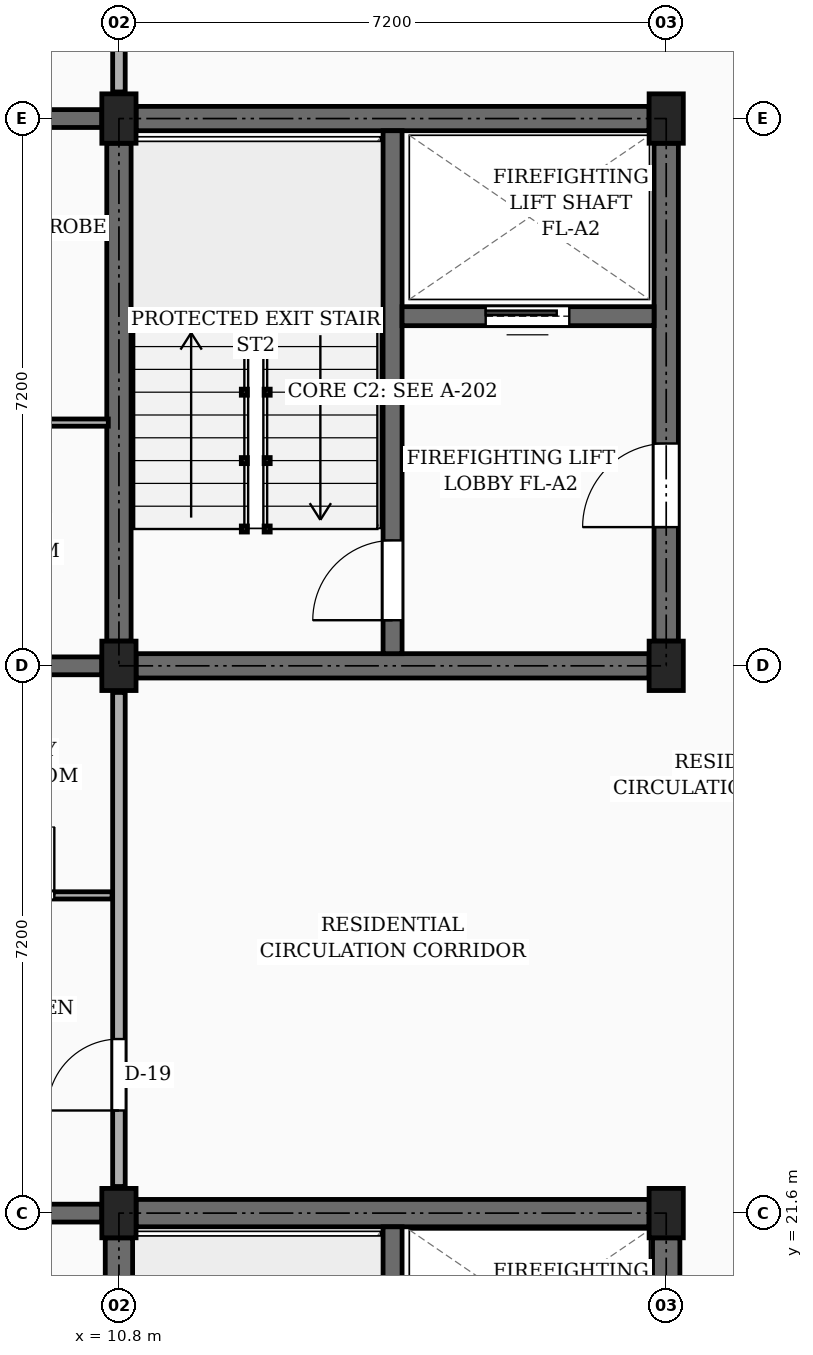
"""IFC4 building model, lengths in metres.
Left out: names, types, materials, properties, quantities, classifications, styles, units other than length and angle.
Written with IfcOpenShell. Run it as: python <this file> out.ifc"""

import sys

from ifc_helpers import new_model, si_unit, direction, frame, frame_2d, origin, origin_2d, place, context, subcontext, project, spatial, rectangle, extrude, element, fill, save


model = new_model("IFC4")
c1 = context("Model", 3, precision=1e-05, world=origin(), true_north=direction((0.0, 1.0)))
c2 = subcontext(c1, "Body", "Model", "MODEL_VIEW")
j1 = project(units=[si_unit("LENGTHUNIT", "METRE"), si_unit("PLANEANGLEUNIT", "RADIAN")], contexts=[c1])
p1 = place(None, origin())
s1 = spatial("IfcSite", under=j1, at=p1, CompositionType="ELEMENT")
p2 = place(p1, origin())
s2 = spatial("IfcBuilding", under=s1, at=p2, CompositionType="ELEMENT")
p3 = place(p2, frame((0.0, 0.0, 17.1)))
s3 = spatial("IfcBuildingStorey", under=s2, at=p3, CompositionType="ELEMENT", Elevation=17.1)
for number, where, z_axis, x_axis in (
    (1, (10.8, 21.6, 0.0), (0.0, 0.0, 1.0), (1.0, 0.0, 0.0)),
    (2, (10.8, 28.8, 0.0), (0.0, 0.0, 1.0), (1.0, 0.0, 0.0)),
    (3, (10.8, 36.0, 0.0), (0.0, 0.0, 1.0), (1.0, 0.0, 0.0)),
    (4, (18.0, 21.6, 0.0), (0.0, 0.0, 1.0), (1.0, 0.0, 0.0)),
    (5, (18.0, 28.8, 0.0), (0.0, 0.0, 1.0), (1.0, 0.0, 0.0)),
    (6, (18.0, 36.0, 0.0), (0.0, 0.0, 1.0), (1.0, 0.0, 0.0)),
):
    element("IfcColumn", number, at=place(p3, frame(where, z_axis=z_axis, x_axis=x_axis)), inside=s3, PredefinedType="COLUMN", context=c2, shape_type="SweptSolid", body=[
        extrude(rectangle(XDim=0.45, YDim=0.65, at=origin_2d()), origin(), (0.0, 0.0, 1.0), 3.15),
    ])
p4 = place(p3, frame((3.875, 21.6, 0.0), z_axis=(0.0, 0.0, 1.0), x_axis=(1.0, 0.0, 0.0)))
e7 = element("IfcWall", 7, at=p4, inside=s3, PredefinedType="SOLIDWALL", context=c2, shape_type="SweptSolid", body=[
    extrude(rectangle(XDim=6.7, YDim=0.235, at=frame_2d((3.35, 0.0))), origin(), (0.0, 0.0, 1.0), 2.17),
])
p5 = place(p3, frame((3.875, 28.8, 0.0), z_axis=(0.0, 0.0, 1.0), x_axis=(1.0, 0.0, 0.0)))
e8 = element("IfcWall", 8, at=p5, inside=s3, PredefinedType="SOLIDWALL", context=c2, shape_type="SweptSolid", body=[
    extrude(rectangle(XDim=6.7, YDim=0.235, at=frame_2d((3.35, 0.0))), origin(), (0.0, 0.0, 1.0), 2.17),
])
p6 = place(p5, frame((1.35, 0.0, 0.0)))
e9 = element("IfcOpeningElement", 9, at=p6, cuts=e8, PredefinedType="OPENING", context=c2, shape_type="SweptSolid", body=[
    extrude(rectangle(XDim=0.98, YDim=2.12, at=frame_2d((0.49, 1.06))), frame((0.0, 0.127, 0.0), z_axis=(0.0, -1.0, 0.0), x_axis=(1.0, 0.0, 0.0)), (0.0, 0.0, 1.0), 0.255),
])
p7 = place(p3, frame((3.875, 36.0, 0.0), z_axis=(0.0, 0.0, 1.0), x_axis=(1.0, 0.0, 0.0)))
e10 = element("IfcWall", 10, at=p7, inside=s3, PredefinedType="SOLIDWALL", context=c2, shape_type="SweptSolid", body=[
    extrude(rectangle(XDim=6.7, YDim=0.235, at=frame_2d((3.35, 0.0))), origin(), (0.0, 0.0, 1.0), 2.17),
])
p8 = place(p3, frame((10.8, 14.725, 0.0), z_axis=(0.0, 0.0, 1.0), x_axis=(0.0, 1.0, 0.0)))
e11 = element("IfcWall", 11, at=p8, inside=s3, PredefinedType="SHEAR", context=c2, shape_type="SweptSolid", body=[
    extrude(rectangle(XDim=6.55, YDim=0.36, at=frame_2d((3.275, 0.0))), origin(), (0.0, 0.0, 1.0), 2.87),
])
p9 = place(p3, frame((11.025, 21.6, 0.0), z_axis=(0.0, 0.0, 1.0), x_axis=(1.0, 0.0, 0.0)))
e12 = element("IfcWall", 12, at=p9, inside=s3, PredefinedType="SHEAR", context=c2, shape_type="SweptSolid", body=[
    extrude(rectangle(XDim=6.75, YDim=0.36, at=frame_2d((3.375, 0.0))), origin(), (0.0, 0.0, 1.0), 2.87),
])
p10 = place(p3, frame((18.0, 14.725, 0.0), z_axis=(0.0, 0.0, 1.0), x_axis=(0.0, 1.0, 0.0)))
e13 = element("IfcWall", 13, at=p10, inside=s3, PredefinedType="SHEAR", context=c2, shape_type="SweptSolid", body=[
    extrude(rectangle(XDim=6.55, YDim=0.36, at=frame_2d((3.275, 0.0))), origin(), (0.0, 0.0, 1.0), 2.87),
])
p11 = place(p10, frame((1.5, 0.0, 0.0)))
e14 = element("IfcOpeningElement", 14, at=p11, cuts=e13, PredefinedType="OPENING", context=c2, shape_type="SweptSolid", body=[
    extrude(rectangle(XDim=1.1, YDim=2.15, at=frame_2d((0.55, 1.075))), frame((0.0, 0.19, 0.0), z_axis=(0.0, -1.0, 0.0), x_axis=(1.0, 0.0, 0.0)), (0.0, 0.0, 1.0), 0.38),
])
p12 = place(p3, frame((14.4, 14.58, 0.0), z_axis=(0.0, 0.0, 1.0), x_axis=(0.0, 1.0, 0.0)))
e15 = element("IfcWall", 15, at=p12, inside=s3, PredefinedType="SHEAR", context=c2, shape_type="SweptSolid", body=[
    extrude(rectangle(XDim=6.84, YDim=0.25, at=frame_2d((3.42, 0.0))), origin(), (0.0, 0.0, 1.0), 2.87),
])
p13 = place(p12, frame((0.42, 0.0, 0.0)))
e16 = element("IfcOpeningElement", 16, at=p13, cuts=e15, PredefinedType="OPENING", context=c2, shape_type="SweptSolid", body=[
    extrude(rectangle(XDim=1.05, YDim=2.15, at=frame_2d((0.525, 1.075))), frame((0.0, 0.135, 0.0), z_axis=(0.0, -1.0, 0.0), x_axis=(1.0, 0.0, 0.0)), (0.0, 0.0, 1.0), 0.27),
])
p14 = place(p3, frame((10.8, 29.125, 0.0), z_axis=(0.0, 0.0, 1.0), x_axis=(0.0, 1.0, 0.0)))
e17 = element("IfcWall", 17, at=p14, inside=s3, PredefinedType="SHEAR", context=c2, shape_type="SweptSolid", body=[
    extrude(rectangle(XDim=6.55, YDim=0.32, at=frame_2d((3.275, 0.0))), origin(), (0.0, 0.0, 1.0), 2.87),
])
p15 = place(p3, frame((11.025, 36.0, 0.0), z_axis=(0.0, 0.0, 1.0), x_axis=(1.0, 0.0, 0.0)))
e18 = element("IfcWall", 18, at=p15, inside=s3, PredefinedType="SHEAR", context=c2, shape_type="SweptSolid", body=[
    extrude(rectangle(XDim=6.75, YDim=0.32, at=frame_2d((3.375, 0.0))), origin(), (0.0, 0.0, 1.0), 2.87),
])
p16 = place(p3, frame((18.0, 29.125, 0.0), z_axis=(0.0, 0.0, 1.0), x_axis=(0.0, 1.0, 0.0)))
e19 = element("IfcWall", 19, at=p16, inside=s3, PredefinedType="SHEAR", context=c2, shape_type="SweptSolid", body=[
    extrude(rectangle(XDim=6.55, YDim=0.32, at=frame_2d((3.275, 0.0))), origin(), (0.0, 0.0, 1.0), 2.87),
])
p17 = place(p16, frame((1.5, 0.0, 0.0)))
e20 = element("IfcOpeningElement", 20, at=p17, cuts=e19, PredefinedType="OPENING", context=c2, shape_type="SweptSolid", body=[
    extrude(rectangle(XDim=1.1, YDim=2.15, at=frame_2d((0.55, 1.075))), frame((0.0, 0.17, 0.0), z_axis=(0.0, -1.0, 0.0), x_axis=(1.0, 0.0, 0.0)), (0.0, 0.0, 1.0), 0.34),
])
p18 = place(p3, frame((11.025, 28.8, 0.0), z_axis=(0.0, 0.0, 1.0), x_axis=(1.0, 0.0, 0.0)))
e21 = element("IfcWall", 21, at=p18, inside=s3, PredefinedType="SHEAR", context=c2, shape_type="SweptSolid", body=[
    extrude(rectangle(XDim=6.75, YDim=0.32, at=frame_2d((3.375, 0.0))), origin(), (0.0, 0.0, 1.0), 2.87),
])
p19 = place(p3, frame((14.4, 28.96, 0.0), z_axis=(0.0, 0.0, 1.0), x_axis=(0.0, 1.0, 0.0)))
e22 = element("IfcWall", 22, at=p19, inside=s3, PredefinedType="SHEAR", context=c2, shape_type="SweptSolid", body=[
    extrude(rectangle(XDim=6.88, YDim=0.25, at=frame_2d((3.44, 0.0))), origin(), (0.0, 0.0, 1.0), 2.87),
])
p20 = place(p19, frame((0.44, 0.0, 0.0)))
e23 = element("IfcOpeningElement", 23, at=p20, cuts=e22, PredefinedType="OPENING", context=c2, shape_type="SweptSolid", body=[
    extrude(rectangle(XDim=1.05, YDim=2.15, at=frame_2d((0.525, 1.075))), frame((0.0, 0.135, 0.0), z_axis=(0.0, -1.0, 0.0), x_axis=(1.0, 0.0, 0.0)), (0.0, 0.0, 1.0), 0.27),
])
p21 = place(p3, frame((14.525, 33.4, 0.0), z_axis=(0.0, 0.0, 1.0), x_axis=(1.0, 0.0, 0.0)))
e24 = element("IfcWall", 24, at=p21, inside=s3, PredefinedType="SHEAR", context=c2, shape_type="SweptSolid", body=[
    extrude(rectangle(XDim=3.315, YDim=0.25, at=frame_2d((1.658, 0.0))), origin(), (0.0, 0.0, 1.0), 2.87),
])
p22 = place(p21, frame((1.1, 0.0, 0.0)))
e25 = element("IfcOpeningElement", 25, at=p22, cuts=e24, PredefinedType="OPENING", context=c2, shape_type="SweptSolid", body=[
    extrude(rectangle(XDim=1.1, YDim=2.2, at=frame_2d((0.55, 1.1))), frame((0.0, 0.135, 0.0), z_axis=(0.0, -1.0, 0.0), x_axis=(1.0, 0.0, 0.0)), (0.0, 0.0, 1.0), 0.27),
])
p23 = place(p3, frame((10.8, 21.95, 0.0), z_axis=(0.0, 0.0, 1.0), x_axis=(0.0, 1.0, 0.0)))
e26 = element("IfcWall", 26, at=p23, inside=s3, PredefinedType="PARTITIONING", context=c2, shape_type="SweptSolid", body=[
    extrude(rectangle(XDim=6.5, YDim=0.165, at=frame_2d((3.25, 0.0))), origin(), (0.0, 0.0, 1.0), 2.305),
])
p24 = place(p23, frame((1.0, 0.0, 0.0)))
e27 = element("IfcOpeningElement", 27, at=p24, cuts=e26, PredefinedType="OPENING", context=c2, shape_type="SweptSolid", body=[
    extrude(rectangle(XDim=0.94, YDim=2.12, at=frame_2d((0.47, 1.06))), frame((0.0, 0.093, 0.0), z_axis=(0.0, -1.0, 0.0), x_axis=(1.0, 0.0, 0.0)), (0.0, 0.0, 1.0), 0.185),
])
p25 = place(p3, frame((10.8, 36.35, 0.0), z_axis=(0.0, 0.0, 1.0), x_axis=(0.0, 1.0, 0.0)))
e28 = element("IfcWall", 28, at=p25, inside=s3, PredefinedType="PARTITIONING", context=c2, shape_type="SweptSolid", body=[
    extrude(rectangle(XDim=6.5, YDim=0.165, at=frame_2d((3.25, 0.0))), origin(), (0.0, 0.0, 1.0), 2.305),
])
p26 = place(p25, frame((1.0, 0.0, 0.0)))
e29 = element("IfcOpeningElement", 29, at=p26, cuts=e28, PredefinedType="OPENING", context=c2, shape_type="SweptSolid", body=[
    extrude(rectangle(XDim=1.14, YDim=2.18, at=frame_2d((0.57, 1.09))), frame((0.0, 0.093, 0.0), z_axis=(0.0, -1.0, 0.0), x_axis=(1.0, 0.0, 0.0)), (0.0, 0.0, 1.0), 0.185),
])
p27 = place(p3, frame((8.29, 25.78, 0.0), z_axis=(0.0, 0.0, 1.0), x_axis=(1.0, 0.0, 0.0)))
e30 = element("IfcWall", 30, at=p27, inside=s3, PredefinedType="PARTITIONING", context=c2, shape_type="SweptSolid", body=[
    extrude(rectangle(XDim=2.42, YDim=0.095, at=frame_2d((1.21, 0.0))), origin(), (0.0, 0.0, 1.0), 2.305),
])
p28 = place(p27, frame((0.76, 0.0, 0.0)))
e31 = element("IfcOpeningElement", 31, at=p28, cuts=e30, PredefinedType="OPENING", context=c2, shape_type="SweptSolid", body=[
    extrude(rectangle(XDim=0.9, YDim=2.05, at=frame_2d((0.45, 1.025))), frame((0.0, 0.058, 0.0), z_axis=(0.0, -1.0, 0.0), x_axis=(1.0, 0.0, 0.0)), (0.0, 0.0, 1.0), 0.115),
])
p29 = place(p3, frame((7.27, 32.0, 0.0), z_axis=(0.0, 0.0, 1.0), x_axis=(1.0, 0.0, 0.0)))
e32 = element("IfcWall", 32, at=p29, inside=s3, PredefinedType="PARTITIONING", context=c2, shape_type="SweptSolid", body=[
    extrude(rectangle(XDim=3.39, YDim=0.095, at=frame_2d((1.695, 0.0))), origin(), (0.0, 0.0, 1.0), 2.305),
])
p30 = place(p17, frame((1.1, 0.0, 0.0), z_axis=(0.0, 0.0, 1.0), x_axis=(-1.0, 0.0, 0.0)))
e33 = element("IfcDoor", 33, at=p30, inside=s3, OperationType="SINGLE_SWING_LEFT", PredefinedType="DOOR", context=c2, shape_type="SweptSolid", body=[
    extrude(rectangle(XDim=1.1, YDim=2.15, at=frame_2d((0.55, 1.075))), frame((0.0, 0.025, 0.0), z_axis=(0.0, -1.0, 0.0), x_axis=(1.0, 0.0, 0.0)), (0.0, 0.0, 1.0), 0.05),
])
fill(e20, e33)
p31 = place(p20, origin())
e34 = element("IfcDoor", 34, at=p31, inside=s3, OperationType="SINGLE_SWING_LEFT", PredefinedType="DOOR", context=c2, shape_type="SweptSolid", body=[
    extrude(rectangle(XDim=1.05, YDim=2.15, at=frame_2d((0.525, 1.075))), frame((0.0, 0.025, 0.0), z_axis=(0.0, -1.0, 0.0), x_axis=(1.0, 0.0, 0.0)), (0.0, 0.0, 1.0), 0.05),
])
fill(e23, e34)
p32 = place(p22, origin())
e35 = element("IfcDoor", 35, at=p32, inside=s3, OperationType="SLIDING_TO_LEFT", PredefinedType="DOOR", context=c2, shape_type="SweptSolid", body=[
    extrude(rectangle(XDim=1.1, YDim=2.2, at=frame_2d((0.55, 1.1))), frame((0.0, 0.025, 0.0), z_axis=(0.0, -1.0, 0.0), x_axis=(1.0, 0.0, 0.0)), (0.0, 0.0, 1.0), 0.05),
])
fill(e25, e35)
p33 = place(p24, origin())
e36 = element("IfcDoor", 36, at=p33, inside=s3, OperationType="SINGLE_SWING_LEFT", PredefinedType="DOOR", context=c2, shape_type="SweptSolid", body=[
    extrude(rectangle(XDim=0.94, YDim=2.12, at=frame_2d((0.47, 1.06))), frame((0.0, 0.025, 0.0), z_axis=(0.0, -1.0, 0.0), x_axis=(1.0, 0.0, 0.0)), (0.0, 0.0, 1.0), 0.05),
])
fill(e27, e36)
p34 = place(p28, origin())
e37 = element("IfcDoor", 37, at=p34, inside=s3, OperationType="SINGLE_SWING_RIGHT", PredefinedType="DOOR", context=c2, shape_type="SweptSolid", body=[
    extrude(rectangle(XDim=0.9, YDim=2.05, at=frame_2d((0.45, 1.025))), frame((0.0, 0.025, 0.0), z_axis=(0.0, -1.0, 0.0), x_axis=(1.0, 0.0, 0.0)), (0.0, 0.0, 1.0), 0.05),
])
fill(e31, e37)
save(model, sys.argv[1])
